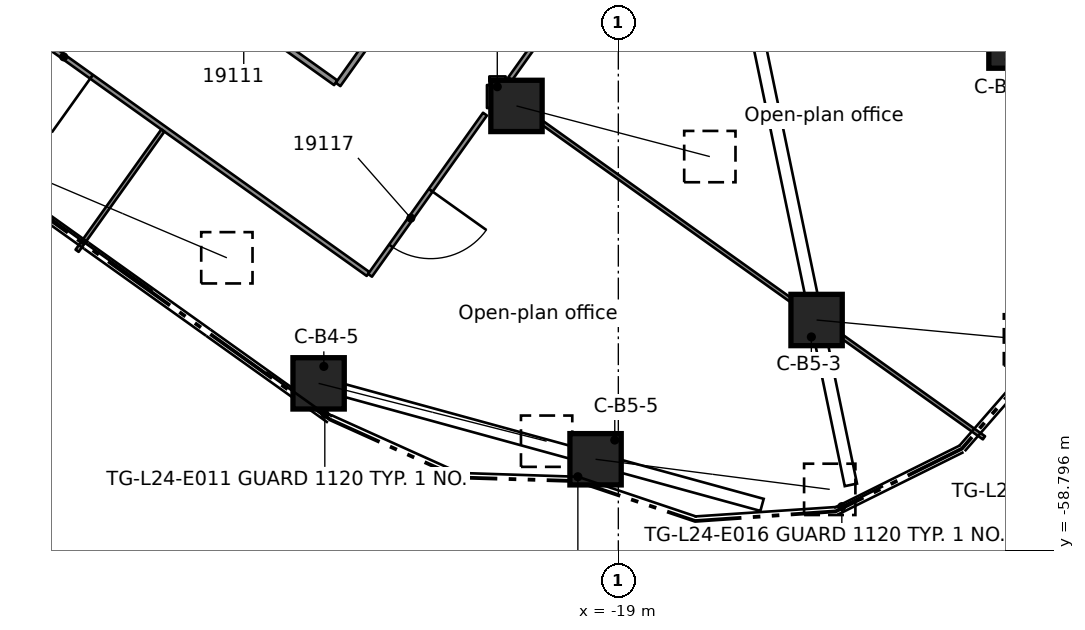
"""IFC4 building model, lengths in metres.
Left out: names, types, materials, properties, quantities, classifications, styles, units other than length and angle.
Written with IfcOpenShell. Run it as: python <this file> out.ifc"""

import sys

from ifc_helpers import new_model, si_unit, direction, frame, frame_2d, origin, origin_2d, place, context, subcontext, project, spatial, rectangle, extrude, element, fill, save


model = new_model("IFC4")
c1 = context("Model", 3, precision=1e-05, world=origin(), true_north=direction((0.0, 1.0)))
c2 = subcontext(c1, "Body", "Model", "MODEL_VIEW")
j1 = project(units=[si_unit("LENGTHUNIT", "METRE"), si_unit("PLANEANGLEUNIT", "RADIAN")], contexts=[c1])
p1 = place(None, origin())
s1 = spatial("IfcSite", under=j1, at=p1, CompositionType="ELEMENT")
p2 = place(p1, origin())
s2 = spatial("IfcBuilding", under=s1, at=p2, CompositionType="ELEMENT")
p3 = place(p2, frame((0.0, 0.0, 98.2)))
s3 = spatial("IfcBuildingStorey", under=s2, at=p3, CompositionType="ELEMENT", Elevation=98.2)
p4 = place(p3, frame((-34.784, -48.766, 0.612), z_axis=(0.834299149524, -0.35421864773, 0.422461925745), x_axis=(0.39080560624, 0.920473235967, 0.0)))
e1 = element("IfcColumn", 1, at=p4, inside=s3, PredefinedType="COLUMN", context=c2, shape_type="SweptSolid", body=[
    extrude(rectangle(XDim=1.35, YDim=1.35, at=origin_2d()), origin(), (0.0, 0.0, 1.0), 6.572),
])
p5 = place(p3, frame((-21.68, -47.098, 0.595), z_axis=(0.853278071018, -0.223555579067, 0.471104485851), x_axis=(0.253442130639, 0.967350549913, 0.0)))
e2 = element("IfcColumn", 2, at=p5, inside=s3, PredefinedType="COLUMN", context=c2, shape_type="SweptSolid", body=[
    extrude(rectangle(XDim=1.35, YDim=1.35, at=origin_2d()), origin(), (0.0, 0.0, 1.0), 5.963),
])
p6 = place(p3, frame((-26.887, -54.398, 0.616), z_axis=(0.884883669901, -0.224461458258, 0.408164114664), x_axis=(0.245875069926, 0.969301526868, 0.0)))
e3 = element("IfcColumn", 3, at=p6, inside=s3, PredefinedType="COLUMN", context=c2, shape_type="SweptSolid", body=[
    extrude(rectangle(XDim=1.35, YDim=1.35, at=origin_2d()), origin(), (0.0, 0.0, 1.0), 6.781),
])
p7 = place(p3, frame((-8.576, -45.431, 0.578), z_axis=(0.853552299411, -0.061145641259, 0.517406689873), x_axis=(0.071453557827, 0.997443927784, 0.0)))
e4 = element("IfcColumn", 4, at=p7, inside=s3, PredefinedType="COLUMN", context=c2, shape_type="SweptSolid", body=[
    extrude(rectangle(XDim=1.35, YDim=1.35, at=origin_2d()), origin(), (0.0, 0.0, 1.0), 5.498),
])
p8 = place(p3, frame((-13.783, -52.731, 0.605), z_axis=(0.891988724473, -0.083266793682, 0.444322806621), x_axis=(0.092945511345, 0.995671196691, 0.0)))
e5 = element("IfcColumn", 5, at=p8, inside=s3, PredefinedType="COLUMN", context=c2, shape_type="SweptSolid", body=[
    extrude(rectangle(XDim=1.35, YDim=1.35, at=origin_2d()), origin(), (0.0, 0.0, 1.0), 6.281),
])
p9 = place(p3, frame((-19.599, -56.395, 0.617), z_axis=(0.906052673299, -0.116451460863, 0.406826265709), x_axis=(0.127477562547, 0.991841454592, 0.0)))
e6 = element("IfcColumn", 6, at=p9, inside=s3, PredefinedType="COLUMN", context=c2, shape_type="SweptSolid", body=[
    extrude(rectangle(XDim=1.35, YDim=1.35, at=origin_2d()), origin(), (0.0, 0.0, 1.0), 6.801),
])
p10 = place(p3, frame((-25.586, -51.52, 0.0), z_axis=(0.0, 0.0, 1.0), x_axis=(-0.814070118749, 0.580766598351, 0.0)))
e7 = element("IfcWall", 7, at=p10, inside=s3, PredefinedType="PARTITIONING", context=c2, shape_type="SweptSolid", body=[
    extrude(rectangle(XDim=13.176, YDim=0.125, at=frame_2d((6.588, 0.0))), origin(), (0.0, 0.0, 1.0), 3.58),
])
p11 = place(p10, frame((8.938, 0.0, 0.0)))
e8 = element("IfcOpeningElement", 8, at=p11, cuts=e7, PredefinedType="OPENING", context=c2, shape_type="SweptSolid", body=[
    extrude(rectangle(XDim=1.8, YDim=2.1, at=frame_2d((0.9, 1.05))), frame((0.0, 0.073, 0.0), z_axis=(0.0, -1.0, 0.0), x_axis=(1.0, 0.0, 0.0)), (0.0, 0.0, 1.0), 0.145),
])
p12 = place(p3, frame((-31.279, -43.035, 0.0), z_axis=(0.0, 0.0, 1.0), x_axis=(0.814146456828, -0.58065957913, 0.0)))
e9 = element("IfcWall", 9, at=p12, inside=s3, PredefinedType="PARTITIONING", context=c2, shape_type="SweptSolid", body=[
    extrude(rectangle(XDim=5.948, YDim=0.15, at=frame_2d((2.974, 0.0))), origin(), (0.0, 0.0, 1.0), 3.58),
])
p13 = place(p12, frame((2.525, 0.0, 0.0)))
e10 = element("IfcOpeningElement", 10, at=p13, cuts=e9, PredefinedType="OPENING", context=c2, shape_type="SweptSolid", body=[
    extrude(rectangle(XDim=0.9, YDim=2.1, at=frame_2d((0.45, 1.05))), frame((0.0, 0.085, 0.0), z_axis=(0.0, -1.0, 0.0), x_axis=(1.0, 0.0, 0.0)), (0.0, 0.0, 1.0), 0.17),
])
p14 = place(p3, frame((-22.302, -46.613, 0.0), z_axis=(0.0, 0.0, 1.0), x_axis=(0.814113642146, -0.580705586052, 0.0)))
e11 = element("IfcWall", 11, at=p14, inside=s3, PredefinedType="PARTITIONING", context=c2, shape_type="SweptSolid", body=[
    extrude(rectangle(XDim=15.874, YDim=0.1, at=frame_2d((7.937, 0.0))), origin(), (0.0, 0.0, 1.0), 3.58),
])
p15 = place(p3, frame((-17.095, -39.395, 0.0), z_axis=(0.0, 0.0, 1.0), x_axis=(0.814054615278, -0.580788329209, 0.0)))
e12 = element("IfcWall", 12, at=p15, inside=s3, PredefinedType="PARTITIONING", context=c2, shape_type="SweptSolid", body=[
    extrude(rectangle(XDim=15.558, YDim=0.1, at=frame_2d((7.779, 0.0))), origin(), (0.0, 0.0, 1.0), 3.58),
])
p16 = place(p3, frame((-22.394, -46.384, 0.0), z_axis=(0.0, 0.0, 1.0), x_axis=(1.0, 0.0, 0.0)))
e13 = element("IfcWall", 13, at=p16, inside=s3, PredefinedType="PARTITIONING", context=c2, shape_type="SweptSolid", body=[
    extrude(rectangle(XDim=0.428, YDim=0.125, at=frame_2d((0.214, 0.0))), origin(), (0.0, 0.0, 1.0), 3.58),
])
p17 = place(p3, frame((-22.509, -47.314, 0.0), z_axis=(0.0, 0.0, 1.0), x_axis=(-0.580683886647, -0.81412911985, 0.0)))
e14 = element("IfcWall", 14, at=p17, inside=s3, PredefinedType="PARTITIONING", context=c2, shape_type="SweptSolid", body=[
    extrude(rectangle(XDim=5.209, YDim=0.125, at=frame_2d((2.604, 0.0))), origin(), (0.0, 0.0, 1.0), 3.58),
])
p18 = place(p17, frame((2.46, 0.0, 0.0)))
e15 = element("IfcOpeningElement", 15, at=p18, cuts=e14, PredefinedType="OPENING", context=c2, shape_type="SweptSolid", body=[
    extrude(rectangle(XDim=1.8, YDim=2.1, at=frame_2d((0.9, 1.05))), frame((0.0, 0.073, 0.0), z_axis=(0.0, -1.0, 0.0), x_axis=(1.0, 0.0, 0.0)), (0.0, 0.0, 1.0), 0.145),
])
p19 = place(p3, frame((-17.301, -40.013, 0.0), z_axis=(0.0, 0.0, 1.0), x_axis=(-0.58071861579, -0.814104347904, 0.0)))
e16 = element("IfcWall", 16, at=p19, inside=s3, PredefinedType="PARTITIONING", context=c2, shape_type="SweptSolid", body=[
    extrude(rectangle(XDim=7.825, YDim=0.125, at=frame_2d((3.912, 0.0))), origin(), (0.0, 0.0, 1.0), 3.58),
])
p20 = place(p19, frame((2.905, 0.0, 0.0)))
e17 = element("IfcOpeningElement", 17, at=p20, cuts=e16, PredefinedType="OPENING", context=c2, shape_type="SweptSolid", body=[
    extrude(rectangle(XDim=1.8, YDim=2.1, at=frame_2d((0.9, 1.05))), frame((0.0, 0.073, 0.0), z_axis=(0.0, -1.0, 0.0), x_axis=(1.0, 0.0, 0.0)), (0.0, 0.0, 1.0), 0.145),
])
p21 = place(p3, frame((-26.375, -46.533, 0.0), z_axis=(0.0, 0.0, 1.0), x_axis=(0.580595189634, 0.814192376392, 0.0)))
e18 = element("IfcWall", 18, at=p21, inside=s3, PredefinedType="PARTITIONING", context=c2, shape_type="SweptSolid", body=[
    extrude(rectangle(XDim=2.299, YDim=0.15, at=frame_2d((1.15, 0.0))), origin(), (0.0, 0.0, 1.0), 3.58),
])
p22 = place(p3, frame((-33.242, -50.909, 0.0), z_axis=(0.0, 0.0, 1.0), x_axis=(0.580721073217, 0.814102594961, 0.0)))
e19 = element("IfcWall", 19, at=p22, inside=s3, PredefinedType="PARTITIONING", context=c2, shape_type="SweptSolid", body=[
    extrude(rectangle(XDim=3.886, YDim=0.1, at=frame_2d((1.943, 0.0))), origin(), (0.0, 0.0, 1.0), 3.58),
])
p23 = place(p3, frame((-22.394, -47.153, 0.0), z_axis=(0.0, 0.0, 1.0), x_axis=(0.0, 1.0, 0.0)))
e20 = element("IfcWall", 20, at=p23, inside=s3, PredefinedType="PARTITIONING", context=c2, shape_type="SweptSolid", body=[
    extrude(rectangle(XDim=0.605, YDim=0.125, at=frame_2d((0.302, 0.0))), origin(), (0.0, 0.0, 1.0), 3.58),
])
p24 = place(p18, origin())
e21 = element("IfcDoor", 21, at=p24, inside=s3, OperationType="DOUBLE_DOOR_SINGLE_SWING", PredefinedType="DOOR", context=c2, shape_type="SweptSolid", body=[
    extrude(rectangle(XDim=1.8, YDim=2.1, at=frame_2d((0.9, 1.05))), frame((0.0, 0.025, 0.0), z_axis=(0.0, -1.0, 0.0), x_axis=(1.0, 0.0, 0.0)), (0.0, 0.0, 1.0), 0.05),
])
fill(e15, e21)
p25 = place(p11, origin())
e22 = element("IfcDoor", 22, at=p25, inside=s3, OperationType="DOUBLE_DOOR_SINGLE_SWING", PredefinedType="DOOR", context=c2, shape_type="SweptSolid", body=[
    extrude(rectangle(XDim=1.8, YDim=2.1, at=frame_2d((0.9, 1.05))), frame((0.0, 0.025, 0.0), z_axis=(0.0, -1.0, 0.0), x_axis=(1.0, 0.0, 0.0)), (0.0, 0.0, 1.0), 0.05),
])
fill(e8, e22)
save(model, sys.argv[1])
